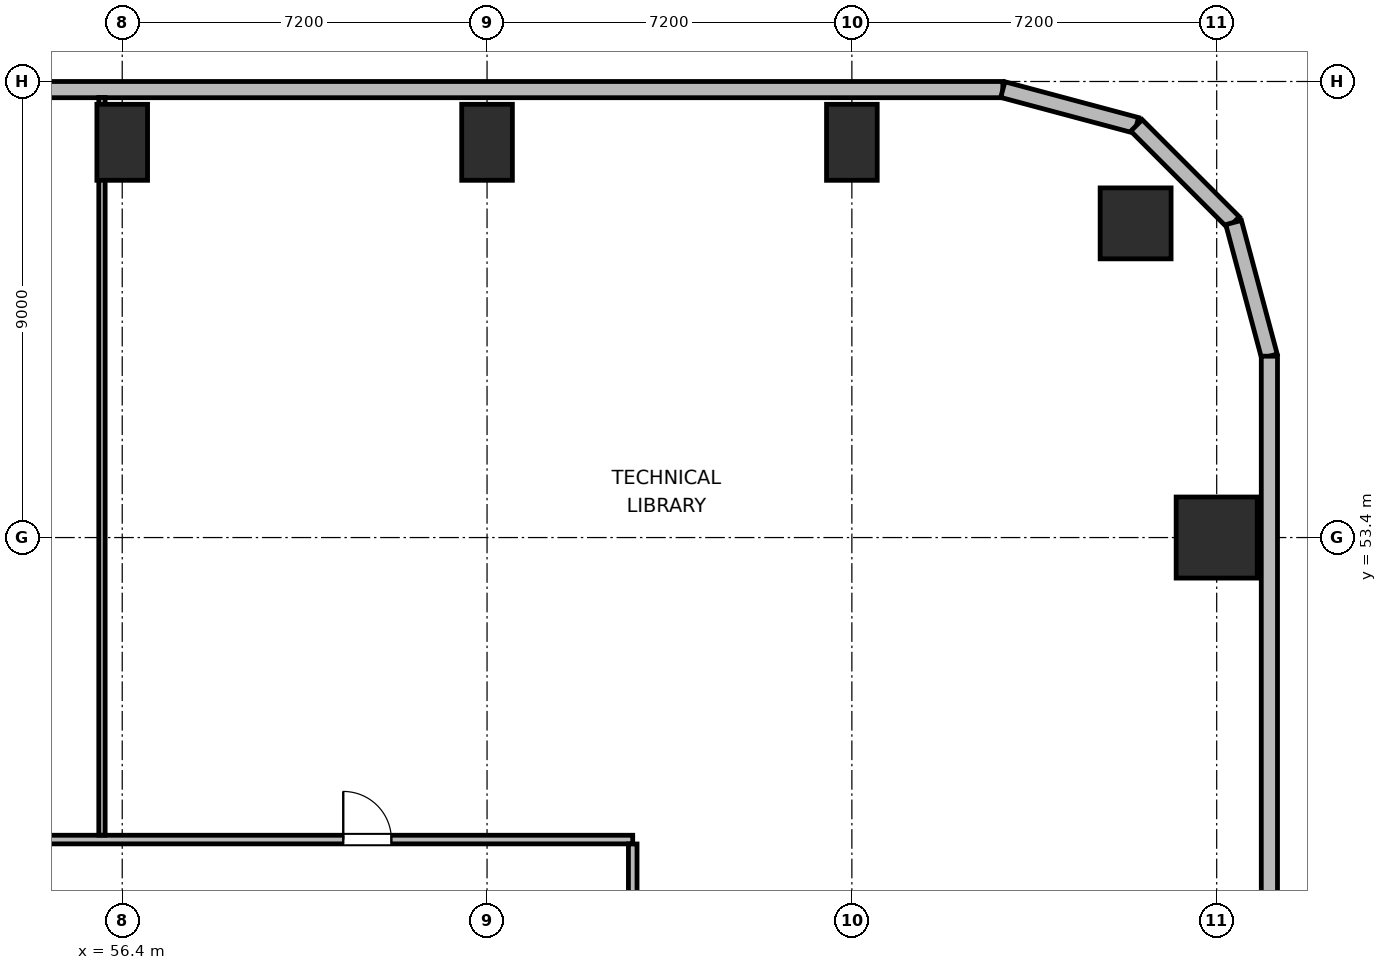
"""IFC4 building model, lengths in metres.
Left out: names, types, materials, properties, quantities, classifications, styles, units other than length and angle.
Written with IfcOpenShell. Run it as: python <this file> out.ifc"""

import sys

from ifc_helpers import new_model, si_unit, direction, frame, frame_2d, origin, origin_2d, place, context, subcontext, project, spatial, rectangle, circle, extrude, element, fill, save


model = new_model("IFC4")
c1 = context("Model", 3, precision=1e-05, world=origin(), true_north=direction((0.0, 1.0)))
c2 = subcontext(c1, "Body", "Model", "MODEL_VIEW")
j1 = project(units=[si_unit("LENGTHUNIT", "METRE"), si_unit("PLANEANGLEUNIT", "RADIAN")], contexts=[c1])
p1 = place(None, origin())
s1 = spatial("IfcSite", under=j1, at=p1, CompositionType="ELEMENT")
p2 = place(p1, origin())
s2 = spatial("IfcBuilding", under=s1, at=p2, CompositionType="ELEMENT")
p3 = place(p2, frame((0.0, 0.0, 76.8)))
s3 = spatial("IfcBuildingStorey", under=s2, at=p3, CompositionType="ELEMENT", Elevation=76.8)
p4 = place(p3, frame((76.4, 59.6, 0.0), z_axis=(0.0, 0.0, 1.0), x_axis=(1.0, 0.0, 0.0)))
e1 = element("IfcColumn", 1, at=p4, inside=s3, PredefinedType="COLUMN", context=c2, shape_type="SweptSolid", body=[
    extrude(circle(Radius=0.7, at=origin_2d()), origin(), (0.0, 0.0, 1.0), 3.9),
])
for number, where, z_axis, x_axis in (
    (2, (56.4, 61.2, 0.0), (0.0, 0.0, 1.0), (1.0, 0.0, 0.0)),
    (3, (63.6, 61.2, 0.0), (0.0, 0.0, 1.0), (1.0, 0.0, 0.0)),
    (4, (70.8, 61.2, 0.0), (0.0, 0.0, 1.0), (1.0, 0.0, 0.0)),
):
    element("IfcColumn", number, at=place(p3, frame(where, z_axis=z_axis, x_axis=x_axis)), inside=s3, PredefinedType="COLUMN", context=c2, shape_type="SweptSolid", body=[
        extrude(rectangle(XDim=1.0, YDim=1.5, at=origin_2d()), origin(), (0.0, 0.0, 1.0), 3.9),
    ])
p5 = place(p3, frame((78.0, 53.4, 0.0), z_axis=(0.0, 0.0, 1.0), x_axis=(1.0, 0.0, 0.0)))
e5 = element("IfcColumn", 5, at=p5, inside=s3, PredefinedType="COLUMN", context=c2, shape_type="SweptSolid", body=[
    extrude(rectangle(XDim=1.6, YDim=1.6, at=origin_2d()), origin(), (0.0, 0.0, 1.0), 3.9),
])
p6 = place(p3, frame((54.645, 62.24, 0.0), z_axis=(0.0, 0.0, 1.0), x_axis=(1.0, 0.0, 0.0)))
e6 = element("IfcWall", 6, at=p6, inside=s3, PredefinedType="SOLIDWALL", context=c2, shape_type="SweptSolid", body=[
    extrude(rectangle(XDim=19.134, YDim=0.32, at=frame_2d((9.567, 0.0))), origin(), (0.0, 0.0, 1.0), 3.6),
])
p7 = place(p3, frame((73.779, 62.24, 0.0), z_axis=(0.0, 0.0, 1.0), x_axis=(0.965964405026, -0.25867502435, 0.0)))
e7 = element("IfcWall", 7, at=p7, inside=s3, PredefinedType="SOLIDWALL", context=c2, shape_type="SweptSolid", body=[
    extrude(rectangle(XDim=2.731, YDim=0.32, at=frame_2d((1.366, 0.0))), origin(), (0.0, 0.0, 1.0), 3.6),
])
p8 = place(p3, frame((76.417, 61.533, 0.0), z_axis=(0.0, 0.0, 1.0), x_axis=(0.707106781187, -0.707106781187, 0.0)))
e8 = element("IfcWall", 8, at=p8, inside=s3, PredefinedType="SOLIDWALL", context=c2, shape_type="SweptSolid", body=[
    extrude(rectangle(XDim=2.71, YDim=0.32, at=frame_2d((1.355, 0.0))), origin(), (0.0, 0.0, 1.0), 3.6),
])
p9 = place(p3, frame((78.333, 59.617, 0.0), z_axis=(0.0, 0.0, 1.0), x_axis=(0.25869736047, -0.965958423373, 0.0)))
e9 = element("IfcWall", 9, at=p9, inside=s3, PredefinedType="SOLIDWALL", context=c2, shape_type="SweptSolid", body=[
    extrude(rectangle(XDim=2.731, YDim=0.32, at=frame_2d((1.366, 0.0))), origin(), (0.0, 0.0, 1.0), 3.6),
])
p10 = place(p3, frame((79.04, 56.979, 0.0), z_axis=(0.0, 0.0, 1.0), x_axis=(0.0, -1.0, 0.0)))
e10 = element("IfcWall", 10, at=p10, inside=s3, PredefinedType="SOLIDWALL", context=c2, shape_type="SweptSolid", body=[
    extrude(rectangle(XDim=14.219, YDim=0.32, at=frame_2d((7.109, 0.0))), origin(), (0.0, 0.0, 1.0), 3.6),
])
p11 = place(p3, frame((29.525, 47.44, 0.0), z_axis=(0.0, 0.0, 1.0), x_axis=(1.0, 0.0, 0.0)))
e11 = element("IfcWall", 11, at=p11, inside=s3, PredefinedType="PARTITIONING", context=c2, shape_type="SweptSolid", body=[
    extrude(rectangle(XDim=36.95, YDim=0.17, at=frame_2d((18.475, 0.0))), origin(), (0.0, 0.0, 1.0), 3.6),
])
p12 = place(p11, frame((1.403, 0.0, 0.0)))
e12 = element("IfcOpeningElement", 12, at=p12, cuts=e11, PredefinedType="OPENING", context=c2, shape_type="SweptSolid", body=[
    extrude(rectangle(XDim=0.95, YDim=2.04, at=frame_2d((0.475, 1.02))), frame((0.0, 0.095, 0.0), z_axis=(0.0, -1.0, 0.0), x_axis=(1.0, 0.0, 0.0)), (0.0, 0.0, 1.0), 0.19),
])
p13 = place(p11, frame((14.64, 0.0, 0.0)))
e13 = element("IfcOpeningElement", 13, at=p13, cuts=e11, PredefinedType="OPENING", context=c2, shape_type="SweptSolid", body=[
    extrude(rectangle(XDim=0.95, YDim=2.04, at=frame_2d((0.475, 1.02))), frame((0.0, 0.095, 0.0), z_axis=(0.0, -1.0, 0.0), x_axis=(1.0, 0.0, 0.0)), (0.0, 0.0, 1.0), 0.19),
])
p14 = place(p11, frame((31.237, 0.0, 0.0)))
e14 = element("IfcOpeningElement", 14, at=p14, cuts=e11, PredefinedType="OPENING", context=c2, shape_type="SweptSolid", body=[
    extrude(rectangle(XDim=0.95, YDim=2.04, at=frame_2d((0.475, 1.02))), frame((0.0, 0.095, 0.0), z_axis=(0.0, -1.0, 0.0), x_axis=(1.0, 0.0, 0.0)), (0.0, 0.0, 1.0), 0.19),
])
p15 = place(p3, frame((66.475, 24.647, 0.0), z_axis=(0.0, 0.0, 1.0), x_axis=(0.0, 1.0, 0.0)))
e15 = element("IfcWall", 15, at=p15, inside=s3, PredefinedType="PARTITIONING", context=c2, shape_type="SweptSolid", body=[
    extrude(rectangle(XDim=22.706, YDim=0.17, at=frame_2d((11.353, 0.0))), origin(), (0.0, 0.0, 1.0), 3.6),
])
p16 = place(p15, frame((4.658, 0.0, 0.0)))
e16 = element("IfcOpeningElement", 16, at=p16, cuts=e15, PredefinedType="OPENING", context=c2, shape_type="SweptSolid", body=[
    extrude(rectangle(XDim=0.95, YDim=2.04, at=frame_2d((0.475, 1.02))), frame((0.0, 0.095, 0.0), z_axis=(0.0, -1.0, 0.0), x_axis=(1.0, 0.0, 0.0)), (0.0, 0.0, 1.0), 0.19),
])
p17 = place(p15, frame((16.098, 0.0, 0.0)))
e17 = element("IfcOpeningElement", 17, at=p17, cuts=e15, PredefinedType="OPENING", context=c2, shape_type="SweptSolid", body=[
    extrude(rectangle(XDim=0.95, YDim=2.04, at=frame_2d((0.475, 1.02))), frame((0.0, 0.095, 0.0), z_axis=(0.0, -1.0, 0.0), x_axis=(1.0, 0.0, 0.0)), (0.0, 0.0, 1.0), 0.19),
])
p18 = place(p3, frame((56.0, 47.527, 0.0), z_axis=(0.0, 0.0, 1.0), x_axis=(0.0, 1.0, 0.0)))
e18 = element("IfcWall", 18, at=p18, inside=s3, PredefinedType="PARTITIONING", context=c2, shape_type="SweptSolid", body=[
    extrude(rectangle(XDim=14.558, YDim=0.125, at=frame_2d((7.279, 0.0))), origin(), (0.0, 0.0, 1.0), 2.185),
])
p19 = place(p14, origin())
e19 = element("IfcDoor", 19, at=p19, inside=s3, OperationType="SINGLE_SWING_LEFT", PredefinedType="DOOR", context=c2, shape_type="SweptSolid", body=[
    extrude(rectangle(XDim=0.95, YDim=2.04, at=frame_2d((0.475, 1.02))), frame((0.0, 0.025, 0.0), z_axis=(0.0, -1.0, 0.0), x_axis=(1.0, 0.0, 0.0)), (0.0, 0.0, 1.0), 0.05),
])
fill(e14, e19)
save(model, sys.argv[1])
